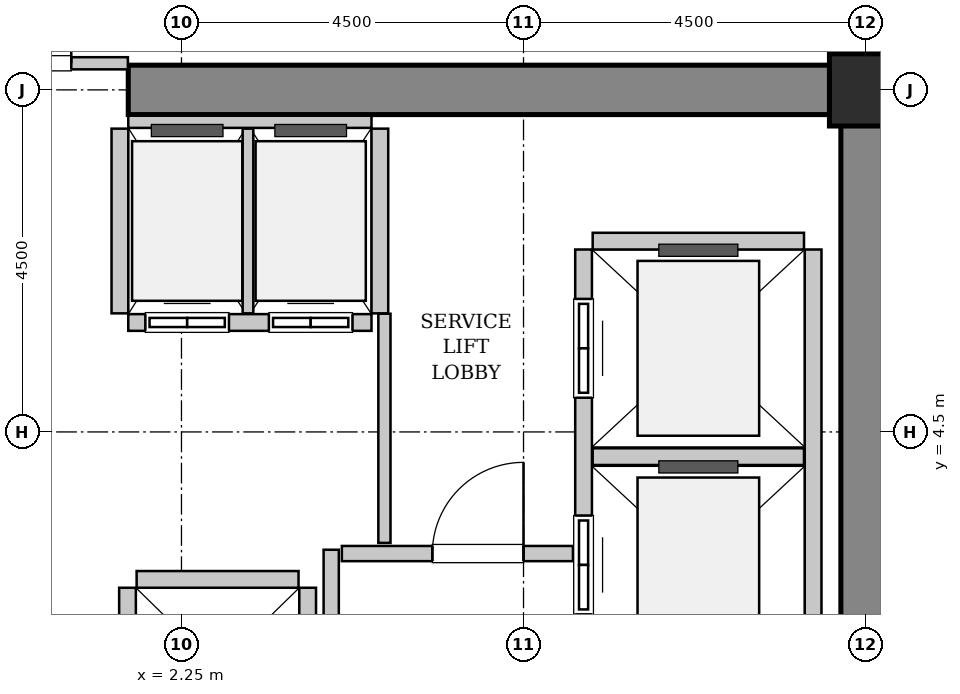
"""IFC4 building model, lengths in metres.
Left out: names, types, materials, properties, quantities, classifications, styles, units other than length and angle.
Written with IfcOpenShell. Run it as: python <this file> out.ifc"""

import sys

from ifc_helpers import new_model, si_unit, direction, frame, frame_2d, origin, origin_2d, place, context, subcontext, project, spatial, rectangle, hollow_rectangle, extrude, source, transform, mapped, element, fill, save


model = new_model("IFC4")
c1 = context("Model", 3, precision=1e-05, world=origin(), true_north=direction((0.0, 1.0)))
c2 = subcontext(c1, "Body", "Model", "MODEL_VIEW")
j1 = project(units=[si_unit("LENGTHUNIT", "METRE"), si_unit("PLANEANGLEUNIT", "RADIAN")], contexts=[c1])
p1 = place(None, origin())
s1 = spatial("IfcSite", under=j1, at=p1, CompositionType="ELEMENT")
p2 = place(p1, origin())
s2 = spatial("IfcBuilding", under=s1, at=p2, CompositionType="ELEMENT")
p3 = place(p2, frame((0.0, 0.0, 63.4)))
s3 = spatial("IfcBuildingStorey", under=s2, at=p3, CompositionType="ELEMENT", Elevation=63.4)
m1 = source(origin(), c2, "Body", "SweptSolid", [
    extrude(rectangle(XDim=10.025, YDim=0.65, at=frame_2d((5.012, 0.0))), origin(), (0.0, 0.0, 1.0), 3.8),
])
p4 = place(p3, frame((1.55, 9.0, 0.0), z_axis=(0.0, 0.0, 1.0), x_axis=(1.0, 0.0, 0.0)))
e1 = element("IfcWall", 1, at=p4, inside=s3, PredefinedType="SHEAR", context=c2, shape_type="MappedRepresentation", body=[
    mapped(m1, transform((0.0, 0.0, 0.0), x_axis=(1.0, 0.0, 0.0), y_axis=(0.0, 1.0, 0.0), z_axis=(0.0, 0.0, 1.0), scale=1.0)),
])
m2 = source(origin(), c2, "Body", "SweptSolid", [
    extrude(rectangle(XDim=7.325, YDim=0.65, at=frame_2d((3.663, 0.0))), origin(), (0.0, 0.0, 1.0), 3.8),
])
p5 = place(p3, frame((11.25, 1.35, 0.0), z_axis=(0.0, 0.0, 1.0), x_axis=(0.0, 1.0, 0.0)))
e2 = element("IfcWall", 2, at=p5, inside=s3, PredefinedType="SHEAR", context=c2, shape_type="MappedRepresentation", body=[
    mapped(m2, transform((0.0, 0.0, 0.0), x_axis=(1.0, 0.0, 0.0), y_axis=(0.0, 1.0, 0.0), z_axis=(0.0, 0.0, 1.0), scale=1.0)),
])
m3 = source(origin(), c2, "Body", "SweptSolid", [
    extrude(hollow_rectangle(XDim=0.95, YDim=0.95, WallThickness=0.045, InnerFilletRadius=0.045, OuterFilletRadius=0.09, at=origin_2d()), origin(), (0.0, 0.0, 1.0), 3.8),
])
p6 = place(p3, frame((11.25, 9.0, 0.0), z_axis=(0.0, 0.0, 1.0), x_axis=(1.0, 0.0, 0.0)))
e3 = element("IfcColumn", 3, at=p6, inside=s3, PredefinedType="COLUMN", context=c2, shape_type="MappedRepresentation", body=[
    mapped(m3, transform((0.0, 0.0, 0.0), x_axis=(1.0, 0.0, 0.0), y_axis=(0.0, 1.0, 0.0), z_axis=(0.0, 0.0, 1.0), scale=1.0)),
])
m4 = source(origin(), c2, "Body", "SweptSolid", [
    extrude(rectangle(XDim=5.45, YDim=0.22, at=frame_2d((2.725, 0.0))), origin(), (0.0, 0.0, 1.0), 3.535),
])
p7 = place(p3, frame((7.54, 6.9, 0.0), z_axis=(0.0, 0.0, 1.0), x_axis=(0.0, -1.0, 0.0)))
e4 = element("IfcWall", 4, at=p7, inside=s3, PredefinedType="SOLIDWALL", context=c2, shape_type="MappedRepresentation", body=[
    mapped(m4, transform((0.0, 0.0, 0.0), x_axis=(1.0, 0.0, 0.0), y_axis=(0.0, 1.0, 0.0), z_axis=(0.0, 0.0, 1.0), scale=1.0)),
])
p8 = place(p7, frame((3.5, 0.0, 0.0)))
e5 = element("IfcOpeningElement", 5, at=p8, cuts=e4, PredefinedType="OPENING", context=c2, shape_type="SweptSolid", body=[
    extrude(rectangle(XDim=1.3, YDim=2.3, at=frame_2d((0.65, 1.15))), frame((0.0, 0.12, 0.0), z_axis=(0.0, -1.0, 0.0), x_axis=(1.0, 0.0, 0.0)), (0.0, 0.0, 1.0), 0.24),
])
p9 = place(p7, frame((0.65, 0.0, 0.0)))
e6 = element("IfcOpeningElement", 6, at=p9, cuts=e4, PredefinedType="OPENING", context=c2, shape_type="SweptSolid", body=[
    extrude(rectangle(XDim=1.3, YDim=2.3, at=frame_2d((0.65, 1.15))), frame((0.0, 0.12, 0.0), z_axis=(0.0, -1.0, 0.0), x_axis=(1.0, 0.0, 0.0)), (0.0, 0.0, 1.0), 0.24),
])
p10 = place(p3, frame((10.56, 1.45, 0.0), z_axis=(0.0, 0.0, 1.0), x_axis=(0.0, 1.0, 0.0)))
e7 = element("IfcWall", 7, at=p10, inside=s3, PredefinedType="SOLIDWALL", context=c2, shape_type="MappedRepresentation", body=[
    mapped(m4, transform((0.0, 0.0, 0.0), x_axis=(1.0, 0.0, 0.0), y_axis=(0.0, 1.0, 0.0), z_axis=(0.0, 0.0, 1.0), scale=1.0)),
])
m5 = source(origin(), c2, "Body", "SweptSolid", [
    extrude(rectangle(XDim=2.78, YDim=0.22, at=frame_2d((1.39, 0.0))), origin(), (0.0, 0.0, 1.0), 3.535),
])
for number, where, z_axis, x_axis in (
    (8, (7.66, 4.175, 0.0), (0.0, 0.0, 1.0), (1.0, 0.0, 0.0)),
    (9, (10.44, 7.01, 0.0), (0.0, 0.0, 1.0), (-1.0, 0.0, 0.0)),
):
    element("IfcWall", number, at=place(p3, frame(where, z_axis=z_axis, x_axis=x_axis)), inside=s3, PredefinedType="SOLIDWALL", context=c2, shape_type="MappedRepresentation", body=[
        mapped(m5, transform((0.0, 0.0, 0.0), x_axis=(1.0, 0.0, 0.0), y_axis=(0.0, 1.0, 0.0), z_axis=(0.0, 0.0, 1.0), scale=1.0)),
    ])
m6 = source(origin(), c2, "Body", "SweptSolid", [
    extrude(rectangle(XDim=3.2, YDim=0.22, at=frame_2d((1.6, 0.0))), origin(), (0.0, 0.0, 1.0), 3.535),
])
p11 = place(p3, frame((1.55, 5.94, 0.0), z_axis=(0.0, 0.0, 1.0), x_axis=(1.0, 0.0, 0.0)))
e10 = element("IfcWall", 10, at=p11, inside=s3, PredefinedType="SOLIDWALL", context=c2, shape_type="MappedRepresentation", body=[
    mapped(m6, transform((0.0, 0.0, 0.0), x_axis=(1.0, 0.0, 0.0), y_axis=(0.0, 1.0, 0.0), z_axis=(0.0, 0.0, 1.0), scale=1.0)),
])
p12 = place(p11, frame((0.225, 0.0, 0.0)))
e11 = element("IfcOpeningElement", 11, at=p12, cuts=e10, PredefinedType="OPENING", context=c2, shape_type="SweptSolid", body=[
    extrude(rectangle(XDim=1.1, YDim=2.2, at=frame_2d((0.55, 1.1))), frame((0.0, 0.12, 0.0), z_axis=(0.0, -1.0, 0.0), x_axis=(1.0, 0.0, 0.0)), (0.0, 0.0, 1.0), 0.24),
])
p13 = place(p11, frame((1.85, 0.0, 0.0)))
e12 = element("IfcOpeningElement", 12, at=p13, cuts=e10, PredefinedType="OPENING", context=c2, shape_type="SweptSolid", body=[
    extrude(rectangle(XDim=1.1, YDim=2.2, at=frame_2d((0.55, 1.1))), frame((0.0, 0.12, 0.0), z_axis=(0.0, -1.0, 0.0), x_axis=(1.0, 0.0, 0.0)), (0.0, 0.0, 1.0), 0.24),
])
m7 = source(origin(), c2, "Body", "SweptSolid", [
    extrude(rectangle(XDim=3.2, YDim=0.16, at=frame_2d((1.6, 0.0))), origin(), (0.0, 0.0, 1.0), 2.425),
])
p14 = place(p3, frame((4.75, 8.58, 0.0), z_axis=(0.0, 0.0, 1.0), x_axis=(-1.0, 0.0, 0.0)))
e13 = element("IfcWall", 13, at=p14, inside=s3, PredefinedType="PARTITIONING", context=c2, shape_type="MappedRepresentation", body=[
    mapped(m7, transform((0.0, 0.0, 0.0), x_axis=(1.0, 0.0, 0.0), y_axis=(0.0, 1.0, 0.0), z_axis=(0.0, 0.0, 1.0), scale=1.0)),
])
m8 = source(origin(), c2, "Body", "SweptSolid", [
    extrude(rectangle(XDim=2.43, YDim=0.22, at=frame_2d((1.215, 0.0))), origin(), (0.0, 0.0, 1.0), 3.535),
])
p15 = place(p3, frame((1.44, 8.49, 0.0), z_axis=(0.0, 0.0, 1.0), x_axis=(0.0, -1.0, 0.0)))
e14 = element("IfcWall", 14, at=p15, inside=s3, PredefinedType="SOLIDWALL", context=c2, shape_type="MappedRepresentation", body=[
    mapped(m8, transform((0.0, 0.0, 0.0), x_axis=(1.0, 0.0, 0.0), y_axis=(0.0, 1.0, 0.0), z_axis=(0.0, 0.0, 1.0), scale=1.0)),
])
m9 = source(origin(), c2, "Body", "SweptSolid", [
    extrude(rectangle(XDim=2.43, YDim=0.14, at=frame_2d((1.215, 0.0))), origin(), (0.0, 0.0, 1.0), 3.535),
])
p16 = place(p3, frame((3.125, 6.06, 0.0), z_axis=(0.0, 0.0, 1.0), x_axis=(0.0, 1.0, 0.0)))
e15 = element("IfcWall", 15, at=p16, inside=s3, PredefinedType="PARTITIONING", context=c2, shape_type="MappedRepresentation", body=[
    mapped(m9, transform((0.0, 0.0, 0.0), x_axis=(1.0, 0.0, 0.0), y_axis=(0.0, 1.0, 0.0), z_axis=(0.0, 0.0, 1.0), scale=1.0)),
])
p17 = place(p3, frame((4.86, 6.06, 0.0), z_axis=(0.0, 0.0, 1.0), x_axis=(0.0, 1.0, 0.0)))
e16 = element("IfcWall", 16, at=p17, inside=s3, PredefinedType="SOLIDWALL", context=c2, shape_type="MappedRepresentation", body=[
    mapped(m8, transform((0.0, 0.0, 0.0), x_axis=(1.0, 0.0, 0.0), y_axis=(0.0, 1.0, 0.0), z_axis=(0.0, 0.0, 1.0), scale=1.0)),
])
m10 = source(origin(), c2, "Body", "SweptSolid", [
    extrude(rectangle(XDim=4.9, YDim=0.22, at=frame_2d((2.45, 0.0))), origin(), (0.0, 0.0, 1.0), 3.535),
])
for number, where, z_axis, x_axis in (
    (17, (1.54, 2.45, 0.0), (0.0, 0.0, 1.0), (0.0, -1.0, 0.0)),
    (18, (3.91, -2.45, 0.0), (0.0, 0.0, 1.0), (0.0, 1.0, 0.0)),
):
    element("IfcWall", number, at=place(p3, frame(where, z_axis=z_axis, x_axis=x_axis)), inside=s3, PredefinedType="SOLIDWALL", context=c2, shape_type="MappedRepresentation", body=[
        mapped(m10, transform((0.0, 0.0, 0.0), x_axis=(1.0, 0.0, 0.0), y_axis=(0.0, 1.0, 0.0), z_axis=(0.0, 0.0, 1.0), scale=1.0)),
    ])
m11 = source(origin(), c2, "Body", "SweptSolid", [
    extrude(rectangle(XDim=2.13, YDim=0.22, at=frame_2d((1.065, 0.0))), origin(), (0.0, 0.0, 1.0), 3.535),
])
p18 = place(p3, frame((3.79, 2.56, 0.0), z_axis=(0.0, 0.0, 1.0), x_axis=(-1.0, 0.0, 0.0)))
e19 = element("IfcWall", 19, at=p18, inside=s3, PredefinedType="SOLIDWALL", context=c2, shape_type="MappedRepresentation", body=[
    mapped(m11, transform((0.0, 0.0, 0.0), x_axis=(1.0, 0.0, 0.0), y_axis=(0.0, 1.0, 0.0), z_axis=(0.0, 0.0, 1.0), scale=1.0)),
])
m12 = source(origin(), c2, "Body", "SweptSolid", [
    extrude(rectangle(XDim=5.9, YDim=0.2, at=frame_2d((2.95, 0.0))), origin(), (0.0, 0.0, 1.0), 3.535),
])
p19 = place(p3, frame((4.22, -2.95, 0.0), z_axis=(0.0, 0.0, 1.0), x_axis=(0.0, 1.0, 0.0)))
e20 = element("IfcWall", 20, at=p19, inside=s3, PredefinedType="PARTITIONING", context=c2, shape_type="MappedRepresentation", body=[
    mapped(m12, transform((0.0, 0.0, 0.0), x_axis=(1.0, 0.0, 0.0), y_axis=(0.0, 1.0, 0.0), z_axis=(0.0, 0.0, 1.0), scale=1.0)),
])
m13 = source(origin(), c2, "Body", "SweptSolid", [
    extrude(rectangle(XDim=3.04, YDim=0.2, at=frame_2d((1.52, 0.0))), origin(), (0.0, 0.0, 1.0), 3.535),
])
p20 = place(p3, frame((4.36, 2.9, 0.0), z_axis=(0.0, 0.0, 1.0), x_axis=(1.0, 0.0, 0.0)))
e21 = element("IfcWall", 21, at=p20, inside=s3, PredefinedType="PARTITIONING", context=c2, shape_type="MappedRepresentation", body=[
    mapped(m13, transform((0.0, 0.0, 0.0), x_axis=(1.0, 0.0, 0.0), y_axis=(0.0, 1.0, 0.0), z_axis=(0.0, 0.0, 1.0), scale=1.0)),
])
p21 = place(p20, frame((1.19, 0.0, 0.0)))
e22 = element("IfcOpeningElement", 22, at=p21, cuts=e21, PredefinedType="OPENING", context=c2, shape_type="SweptSolid", body=[
    extrude(rectangle(XDim=1.2, YDim=2.15, at=frame_2d((0.6, 1.075))), frame((0.0, 0.11, 0.0), z_axis=(0.0, -1.0, 0.0), x_axis=(1.0, 0.0, 0.0)), (0.0, 0.0, 1.0), 0.22),
])
m14 = source(origin(), c2, "Body", "SweptSolid", [
    extrude(rectangle(XDim=3.09, YDim=0.16, at=frame_2d((1.545, 0.0))), origin(), (0.0, 0.0, 1.0), 2.425),
])
p22 = place(p3, frame((-1.545, 9.35, 0.0), z_axis=(0.0, 0.0, 1.0), x_axis=(1.0, 0.0, 0.0)))
e23 = element("IfcWall", 23, at=p22, inside=s3, PredefinedType="PARTITIONING", context=c2, shape_type="MappedRepresentation", body=[
    mapped(m14, transform((0.0, 0.0, 0.0), x_axis=(1.0, 0.0, 0.0), y_axis=(0.0, 1.0, 0.0), z_axis=(0.0, 0.0, 1.0), scale=1.0)),
])
p23 = place(p22, frame((0.745, 0.0, 0.0)))
e24 = element("IfcOpeningElement", 24, at=p23, cuts=e23, PredefinedType="OPENING", context=c2, shape_type="SweptSolid", body=[
    extrude(rectangle(XDim=1.6, YDim=2.3, at=frame_2d((0.8, 1.15))), frame((0.0, 0.09, 0.0), z_axis=(0.0, -1.0, 0.0), x_axis=(1.0, 0.0, 0.0)), (0.0, 0.0, 1.0), 0.18),
])
m15 = source(origin(), c2, "Body", "SweptSolid", [
    extrude(rectangle(XDim=3.015, YDim=0.16, at=frame_2d((1.507, 0.0))), origin(), (0.0, 0.0, 1.0), 3.535),
])
p24 = place(p3, frame((4.92, 3.04, 0.0), z_axis=(0.0, 0.0, 1.0), x_axis=(0.0, 1.0, 0.0)))
e25 = element("IfcWall", 25, at=p24, inside=s3, PredefinedType="PARTITIONING", context=c2, shape_type="MappedRepresentation", body=[
    mapped(m15, transform((0.0, 0.0, 0.0), x_axis=(1.0, 0.0, 0.0), y_axis=(0.0, 1.0, 0.0), z_axis=(0.0, 0.0, 1.0), scale=1.0)),
])
m16 = source(origin(), c2, "Body", "SweptSolid", [
    extrude(rectangle(XDim=1.3, YDim=2.3, at=frame_2d((0.65, 1.15))), frame((0.0, 0.025, 0.0), z_axis=(0.0, -1.0, 0.0), x_axis=(1.0, 0.0, 0.0)), (0.0, 0.0, 1.0), 0.05),
])
p25 = place(p8, origin())
e26 = element("IfcDoor", 26, at=p25, inside=s3, OperationType="SLIDING_TO_RIGHT", PredefinedType="DOOR", context=c2, shape_type="MappedRepresentation", body=[
    mapped(m16, transform((0.0, 0.0, 0.0), x_axis=(1.0, 0.0, 0.0), y_axis=(0.0, 1.0, 0.0), z_axis=(0.0, 0.0, 1.0), scale=1.0)),
])
fill(e5, e26)
p26 = place(p9, origin())
e27 = element("IfcDoor", 27, at=p26, inside=s3, OperationType="SLIDING_TO_RIGHT", PredefinedType="DOOR", context=c2, shape_type="MappedRepresentation", body=[
    mapped(m16, transform((0.0, 0.0, 0.0), x_axis=(1.0, 0.0, 0.0), y_axis=(0.0, 1.0, 0.0), z_axis=(0.0, 0.0, 1.0), scale=1.0)),
])
fill(e6, e27)
m17 = source(origin(), c2, "Body", "SweptSolid", [
    extrude(rectangle(XDim=1.1, YDim=2.2, at=frame_2d((0.55, 1.1))), frame((0.0, 0.025, 0.0), z_axis=(0.0, -1.0, 0.0), x_axis=(1.0, 0.0, 0.0)), (0.0, 0.0, 1.0), 0.05),
])
p27 = place(p12, origin())
e28 = element("IfcDoor", 28, at=p27, inside=s3, OperationType="DOUBLE_DOOR_SLIDING", PredefinedType="DOOR", context=c2, shape_type="MappedRepresentation", body=[
    mapped(m17, transform((0.0, 0.0, 0.0), x_axis=(1.0, 0.0, 0.0), y_axis=(0.0, 1.0, 0.0), z_axis=(0.0, 0.0, 1.0), scale=1.0)),
])
fill(e11, e28)
p28 = place(p13, origin())
e29 = element("IfcDoor", 29, at=p28, inside=s3, OperationType="DOUBLE_DOOR_SLIDING", PredefinedType="DOOR", context=c2, shape_type="MappedRepresentation", body=[
    mapped(m17, transform((0.0, 0.0, 0.0), x_axis=(1.0, 0.0, 0.0), y_axis=(0.0, 1.0, 0.0), z_axis=(0.0, 0.0, 1.0), scale=1.0)),
])
fill(e12, e29)
m18 = source(origin(), c2, "Body", "SweptSolid", [
    extrude(rectangle(XDim=1.2, YDim=2.15, at=frame_2d((0.6, 1.075))), frame((0.0, 0.025, 0.0), z_axis=(0.0, -1.0, 0.0), x_axis=(1.0, 0.0, 0.0)), (0.0, 0.0, 1.0), 0.05),
])
p29 = place(p21, origin())
e30 = element("IfcDoor", 30, at=p29, inside=s3, OperationType="SINGLE_SWING_RIGHT", PredefinedType="DOOR", context=c2, shape_type="MappedRepresentation", body=[
    mapped(m18, transform((0.0, 0.0, 0.0), x_axis=(1.0, 0.0, 0.0), y_axis=(0.0, 1.0, 0.0), z_axis=(0.0, 0.0, 1.0), scale=1.0)),
])
fill(e22, e30)
m19 = source(origin(), c2, "Body", "SweptSolid", [
    extrude(rectangle(XDim=1.6, YDim=2.3, at=frame_2d((0.8, 1.15))), frame((0.0, 0.025, 0.0), z_axis=(0.0, -1.0, 0.0), x_axis=(1.0, 0.0, 0.0)), (0.0, 0.0, 1.0), 0.05),
])
p30 = place(p23, origin())
e31 = element("IfcDoor", 31, at=p30, inside=s3, OperationType="DOUBLE_DOOR_SINGLE_SWING", PredefinedType="DOOR", context=c2, shape_type="MappedRepresentation", body=[
    mapped(m19, transform((0.0, 0.0, 0.0), x_axis=(1.0, 0.0, 0.0), y_axis=(0.0, 1.0, 0.0), z_axis=(0.0, 0.0, 1.0), scale=1.0)),
])
fill(e24, e31)
save(model, sys.argv[1])
